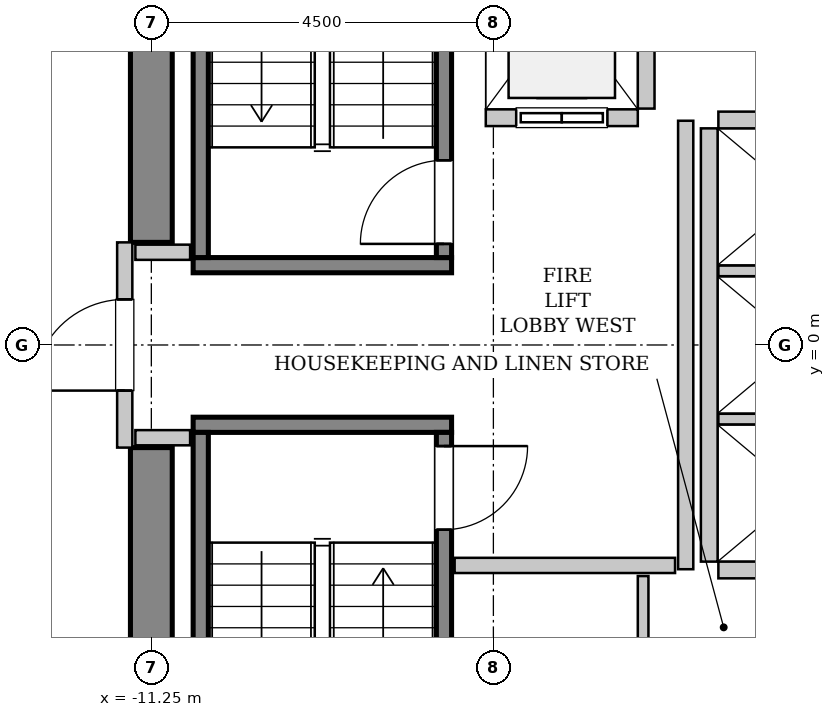
"""IFC4 building model, lengths in metres.
Left out: names, types, materials, properties, quantities, classifications, styles, units other than length and angle.
Written with IfcOpenShell. Run it as: python <this file> out.ifc"""

import sys

from ifc_helpers import new_model, si_unit, direction, frame, frame_2d, origin, place, context, subcontext, project, spatial, rectangle, extrude, source, transform, mapped, element, fill, save


model = new_model("IFC4")
c1 = context("Model", 3, precision=1e-05, world=origin(), true_north=direction((0.0, 1.0)))
c2 = subcontext(c1, "Body", "Model", "MODEL_VIEW")
j1 = project(units=[si_unit("LENGTHUNIT", "METRE"), si_unit("PLANEANGLEUNIT", "RADIAN")], contexts=[c1])
p1 = place(None, origin())
s1 = spatial("IfcSite", under=j1, at=p1, CompositionType="ELEMENT")
p2 = place(p1, origin())
s2 = spatial("IfcBuilding", under=s1, at=p2, CompositionType="ELEMENT")
p3 = place(p2, frame((0.0, 0.0, 136.4)))
s3 = spatial("IfcBuildingStorey", under=s2, at=p3, CompositionType="ELEMENT", Elevation=136.4)
m1 = source(origin(), c2, "Body", "SweptSolid", [
    extrude(rectangle(XDim=7.375, YDim=0.55, at=frame_2d((3.688, 0.0))), origin(), (0.0, 0.0, 1.0), 3.8),
])
for number, where, z_axis, x_axis in (
    (1, (-11.25, -8.725, 0.0), (0.0, 0.0, 1.0), (0.0, 1.0, 0.0)),
    (2, (-11.25, 1.35, 0.0), (0.0, 0.0, 1.0), (0.0, 1.0, 0.0)),
):
    element("IfcWall", number, at=place(p3, frame(where, z_axis=z_axis, x_axis=x_axis)), inside=s3, PredefinedType="SHEAR", context=c2, shape_type="MappedRepresentation", body=[
        mapped(m1, transform((0.0, 0.0, 0.0), x_axis=(1.0, 0.0, 0.0), y_axis=(0.0, 1.0, 0.0), z_axis=(0.0, 0.0, 1.0), scale=1.0)),
    ])
m2 = source(origin(), c2, "Body", "SweptSolid", [
    extrude(rectangle(XDim=3.4, YDim=0.2, at=frame_2d((1.7, 0.0))), origin(), (0.0, 0.0, 1.0), 3.8),
])
p4 = place(p3, frame((-7.3, 1.05, 0.0), z_axis=(0.0, 0.0, 1.0), x_axis=(-1.0, 0.0, 0.0)))
e3 = element("IfcWall", 3, at=p4, inside=s3, PredefinedType="SOLIDWALL", context=c2, shape_type="MappedRepresentation", body=[
    mapped(m2, transform((0.0, 0.0, 0.0), x_axis=(1.0, 0.0, 0.0), y_axis=(0.0, 1.0, 0.0), z_axis=(0.0, 0.0, 1.0), scale=1.0)),
])
m3 = source(origin(), c2, "Body", "SweptSolid", [
    extrude(rectangle(XDim=7.1, YDim=0.2, at=frame_2d((3.55, 0.0))), origin(), (0.0, 0.0, 1.0), 3.8),
])
p5 = place(p3, frame((-7.4, 1.15, 0.0), z_axis=(0.0, 0.0, 1.0), x_axis=(0.0, 1.0, 0.0)))
e4 = element("IfcWall", 4, at=p5, inside=s3, PredefinedType="SOLIDWALL", context=c2, shape_type="MappedRepresentation", body=[
    mapped(m3, transform((0.0, 0.0, 0.0), x_axis=(1.0, 0.0, 0.0), y_axis=(0.0, 1.0, 0.0), z_axis=(0.0, 0.0, 1.0), scale=1.0)),
])
p6 = place(p5, frame((0.18, 0.0, 0.0)))
e5 = element("IfcOpeningElement", 5, at=p6, cuts=e4, PredefinedType="OPENING", context=c2, shape_type="SweptSolid", body=[
    extrude(rectangle(XDim=1.1, YDim=2.15, at=frame_2d((0.55, 1.075))), frame((0.0, 0.11, 0.0), z_axis=(0.0, -1.0, 0.0), x_axis=(1.0, 0.0, 0.0)), (0.0, 0.0, 1.0), 0.22),
])
p7 = place(p3, frame((-10.6, 1.15, 0.0), z_axis=(0.0, 0.0, 1.0), x_axis=(0.0, 1.0, 0.0)))
e6 = element("IfcWall", 6, at=p7, inside=s3, PredefinedType="SOLIDWALL", context=c2, shape_type="MappedRepresentation", body=[
    mapped(m3, transform((0.0, 0.0, 0.0), x_axis=(1.0, 0.0, 0.0), y_axis=(0.0, 1.0, 0.0), z_axis=(0.0, 0.0, 1.0), scale=1.0)),
])
p8 = place(p3, frame((-10.7, -1.05, 0.0), z_axis=(0.0, 0.0, 1.0), x_axis=(1.0, 0.0, 0.0)))
e7 = element("IfcWall", 7, at=p8, inside=s3, PredefinedType="SOLIDWALL", context=c2, shape_type="MappedRepresentation", body=[
    mapped(m2, transform((0.0, 0.0, 0.0), x_axis=(1.0, 0.0, 0.0), y_axis=(0.0, 1.0, 0.0), z_axis=(0.0, 0.0, 1.0), scale=1.0)),
])
p9 = place(p3, frame((-10.6, -1.15, 0.0), z_axis=(0.0, 0.0, 1.0), x_axis=(0.0, -1.0, 0.0)))
e8 = element("IfcWall", 8, at=p9, inside=s3, PredefinedType="SOLIDWALL", context=c2, shape_type="MappedRepresentation", body=[
    mapped(m3, transform((0.0, 0.0, 0.0), x_axis=(1.0, 0.0, 0.0), y_axis=(0.0, 1.0, 0.0), z_axis=(0.0, 0.0, 1.0), scale=1.0)),
])
p10 = place(p3, frame((-7.4, -1.15, 0.0), z_axis=(0.0, 0.0, 1.0), x_axis=(0.0, -1.0, 0.0)))
e9 = element("IfcWall", 9, at=p10, inside=s3, PredefinedType="SOLIDWALL", context=c2, shape_type="MappedRepresentation", body=[
    mapped(m3, transform((0.0, 0.0, 0.0), x_axis=(1.0, 0.0, 0.0), y_axis=(0.0, 1.0, 0.0), z_axis=(0.0, 0.0, 1.0), scale=1.0)),
])
p11 = place(p10, frame((0.18, 0.0, 0.0)))
e10 = element("IfcOpeningElement", 10, at=p11, cuts=e9, PredefinedType="OPENING", context=c2, shape_type="SweptSolid", body=[
    extrude(rectangle(XDim=1.1, YDim=2.15, at=frame_2d((0.55, 1.075))), frame((0.0, 0.11, 0.0), z_axis=(0.0, -1.0, 0.0), x_axis=(1.0, 0.0, 0.0)), (0.0, 0.0, 1.0), 0.22),
])
m4 = source(origin(), c2, "Body", "SweptSolid", [
    extrude(rectangle(XDim=2.0, YDim=0.22, at=frame_2d((1.0, 0.0))), origin(), (0.0, 0.0, 1.0), 3.535),
])
p12 = place(p3, frame((-6.85, 2.99, 0.0), z_axis=(0.0, 0.0, 1.0), x_axis=(1.0, 0.0, 0.0)))
e11 = element("IfcWall", 11, at=p12, inside=s3, PredefinedType="SOLIDWALL", context=c2, shape_type="MappedRepresentation", body=[
    mapped(m4, transform((0.0, 0.0, 0.0), x_axis=(1.0, 0.0, 0.0), y_axis=(0.0, 1.0, 0.0), z_axis=(0.0, 0.0, 1.0), scale=1.0)),
])
p13 = place(p12, frame((0.4, 0.0, 0.0)))
e12 = element("IfcOpeningElement", 12, at=p13, cuts=e11, PredefinedType="OPENING", context=c2, shape_type="SweptSolid", body=[
    extrude(rectangle(XDim=1.2, YDim=2.2, at=frame_2d((0.6, 1.1))), frame((0.0, 0.12, 0.0), z_axis=(0.0, -1.0, 0.0), x_axis=(1.0, 0.0, 0.0)), (0.0, 0.0, 1.0), 0.24),
])
m5 = source(origin(), c2, "Body", "SweptSolid", [
    extrude(rectangle(XDim=2.68, YDim=0.22, at=frame_2d((1.34, 0.0))), origin(), (0.0, 0.0, 1.0), 3.535),
])
p14 = place(p3, frame((-4.74, 3.11, 0.0), z_axis=(0.0, 0.0, 1.0), x_axis=(0.0, 1.0, 0.0)))
e13 = element("IfcWall", 13, at=p14, inside=s3, PredefinedType="SOLIDWALL", context=c2, shape_type="MappedRepresentation", body=[
    mapped(m5, transform((0.0, 0.0, 0.0), x_axis=(1.0, 0.0, 0.0), y_axis=(0.0, 1.0, 0.0), z_axis=(0.0, 0.0, 1.0), scale=1.0)),
])
m6 = source(origin(), c2, "Body", "SweptSolid", [
    extrude(rectangle(XDim=5.7, YDim=0.22, at=frame_2d((2.85, 0.0))), origin(), (0.0, 0.0, 1.0), 3.535),
])
p15 = place(p3, frame((-3.91, 2.85, 0.0), z_axis=(0.0, 0.0, 1.0), x_axis=(0.0, -1.0, 0.0)))
e14 = element("IfcWall", 14, at=p15, inside=s3, PredefinedType="SOLIDWALL", context=c2, shape_type="MappedRepresentation", body=[
    mapped(m6, transform((0.0, 0.0, 0.0), x_axis=(1.0, 0.0, 0.0), y_axis=(0.0, 1.0, 0.0), z_axis=(0.0, 0.0, 1.0), scale=1.0)),
])
m7 = source(origin(), c2, "Body", "SweptSolid", [
    extrude(rectangle(XDim=2.13, YDim=0.22, at=frame_2d((1.065, 0.0))), origin(), (0.0, 0.0, 1.0), 3.535),
])
p16 = place(p3, frame((-3.79, -2.96, 0.0), z_axis=(0.0, 0.0, 1.0), x_axis=(1.0, 0.0, 0.0)))
e15 = element("IfcWall", 15, at=p16, inside=s3, PredefinedType="SOLIDWALL", context=c2, shape_type="MappedRepresentation", body=[
    mapped(m7, transform((0.0, 0.0, 0.0), x_axis=(1.0, 0.0, 0.0), y_axis=(0.0, 1.0, 0.0), z_axis=(0.0, 0.0, 1.0), scale=1.0)),
])
m8 = source(origin(), c2, "Body", "SweptSolid", [
    extrude(rectangle(XDim=2.13, YDim=0.14, at=frame_2d((1.065, 0.0))), origin(), (0.0, 0.0, 1.0), 3.535),
])
for number, where, z_axis, x_axis in (
    (16, (-3.79, -0.975, 0.0), (0.0, 0.0, 1.0), (1.0, 0.0, 0.0)),
    (17, (-3.79, 0.975, 0.0), (0.0, 0.0, 1.0), (1.0, 0.0, 0.0)),
):
    element("IfcWall", number, at=place(p3, frame(where, z_axis=z_axis, x_axis=x_axis)), inside=s3, PredefinedType="PARTITIONING", context=c2, shape_type="MappedRepresentation", body=[
        mapped(m8, transform((0.0, 0.0, 0.0), x_axis=(1.0, 0.0, 0.0), y_axis=(0.0, 1.0, 0.0), z_axis=(0.0, 0.0, 1.0), scale=1.0)),
    ])
p17 = place(p3, frame((-1.66, 2.96, 0.0), z_axis=(0.0, 0.0, 1.0), x_axis=(-1.0, 0.0, 0.0)))
e18 = element("IfcWall", 18, at=p17, inside=s3, PredefinedType="SOLIDWALL", context=c2, shape_type="MappedRepresentation", body=[
    mapped(m7, transform((0.0, 0.0, 0.0), x_axis=(1.0, 0.0, 0.0), y_axis=(0.0, 1.0, 0.0), z_axis=(0.0, 0.0, 1.0), scale=1.0)),
])
m9 = source(origin(), c2, "Body", "SweptSolid", [
    extrude(rectangle(XDim=2.7, YDim=0.2, at=frame_2d((1.35, 0.0))), origin(), (0.0, 0.0, 1.0), 2.425),
])
p18 = place(p3, frame((-11.6, -1.35, 0.0), z_axis=(0.0, 0.0, 1.0), x_axis=(0.0, 1.0, 0.0)))
e19 = element("IfcWall", 19, at=p18, inside=s3, PredefinedType="PARTITIONING", context=c2, shape_type="MappedRepresentation", body=[
    mapped(m9, transform((0.0, 0.0, 0.0), x_axis=(1.0, 0.0, 0.0), y_axis=(0.0, 1.0, 0.0), z_axis=(0.0, 0.0, 1.0), scale=1.0)),
])
p19 = place(p18, frame((0.75, 0.0, 0.0)))
e20 = element("IfcOpeningElement", 20, at=p19, cuts=e19, PredefinedType="OPENING", context=c2, shape_type="SweptSolid", body=[
    extrude(rectangle(XDim=1.2, YDim=2.15, at=frame_2d((0.6, 1.075))), frame((0.0, 0.11, 0.0), z_axis=(0.0, -1.0, 0.0), x_axis=(1.0, 0.0, 0.0)), (0.0, 0.0, 1.0), 0.22),
])
m10 = source(origin(), c2, "Body", "SweptSolid", [
    extrude(rectangle(XDim=5.9, YDim=0.2, at=frame_2d((2.95, 0.0))), origin(), (0.0, 0.0, 1.0), 3.535),
])
p20 = place(p3, frame((-4.22, -2.95, 0.0), z_axis=(0.0, 0.0, 1.0), x_axis=(0.0, 1.0, 0.0)))
e21 = element("IfcWall", 21, at=p20, inside=s3, PredefinedType="PARTITIONING", context=c2, shape_type="MappedRepresentation", body=[
    mapped(m10, transform((0.0, 0.0, 0.0), x_axis=(1.0, 0.0, 0.0), y_axis=(0.0, 1.0, 0.0), z_axis=(0.0, 0.0, 1.0), scale=1.0)),
])
m11 = source(origin(), c2, "Body", "SweptSolid", [
    extrude(rectangle(XDim=2.9, YDim=0.2, at=frame_2d((1.45, 0.0))), origin(), (0.0, 0.0, 1.0), 3.535),
])
p21 = place(p3, frame((-7.26, -2.9, 0.0), z_axis=(0.0, 0.0, 1.0), x_axis=(1.0, 0.0, 0.0)))
e22 = element("IfcWall", 22, at=p21, inside=s3, PredefinedType="PARTITIONING", context=c2, shape_type="MappedRepresentation", body=[
    mapped(m11, transform((0.0, 0.0, 0.0), x_axis=(1.0, 0.0, 0.0), y_axis=(0.0, 1.0, 0.0), z_axis=(0.0, 0.0, 1.0), scale=1.0)),
])
m12 = source(origin(), c2, "Body", "SweptSolid", [
    extrude(rectangle(XDim=0.72, YDim=0.2, at=frame_2d((0.36, 0.0))), origin(), (0.0, 0.0, 1.0), 3.535),
])
for number, where, z_axis, x_axis in (
    (23, (-11.46, 1.22, 0.0), (0.0, 0.0, 1.0), (1.0, 0.0, 0.0)),
    (24, (-11.46, -1.22, 0.0), (0.0, 0.0, 1.0), (1.0, 0.0, 0.0)),
):
    element("IfcWall", number, at=place(p3, frame(where, z_axis=z_axis, x_axis=x_axis)), inside=s3, PredefinedType="PARTITIONING", context=c2, shape_type="MappedRepresentation", body=[
        mapped(m12, transform((0.0, 0.0, 0.0), x_axis=(1.0, 0.0, 0.0), y_axis=(0.0, 1.0, 0.0), z_axis=(0.0, 0.0, 1.0), scale=1.0)),
    ])
m13 = source(origin(), c2, "Body", "SweptSolid", [
    extrude(rectangle(XDim=1.26, YDim=0.14, at=frame_2d((0.63, 0.0))), origin(), (0.0, 0.0, 1.0), 3.535),
])
p22 = place(p3, frame((-4.78, -4.3, 0.0), z_axis=(0.0, 0.0, 1.0), x_axis=(0.0, 1.0, 0.0)))
e25 = element("IfcWall", 25, at=p22, inside=s3, PredefinedType="PARTITIONING", context=c2, shape_type="MappedRepresentation", body=[
    mapped(m13, transform((0.0, 0.0, 0.0), x_axis=(1.0, 0.0, 0.0), y_axis=(0.0, 1.0, 0.0), z_axis=(0.0, 0.0, 1.0), scale=1.0)),
])
m14 = source(origin(), c2, "Body", "SweptSolid", [
    extrude(rectangle(XDim=1.1, YDim=2.15, at=frame_2d((0.55, 1.075))), frame((0.0, 0.025, 0.0), z_axis=(0.0, -1.0, 0.0), x_axis=(1.0, 0.0, 0.0)), (0.0, 0.0, 1.0), 0.05),
])
p23 = place(p6, origin())
e26 = element("IfcDoor", 26, at=p23, inside=s3, OperationType="SINGLE_SWING_LEFT", PredefinedType="DOOR", context=c2, shape_type="MappedRepresentation", body=[
    mapped(m14, transform((0.0, 0.0, 0.0), x_axis=(1.0, 0.0, 0.0), y_axis=(0.0, 1.0, 0.0), z_axis=(0.0, 0.0, 1.0), scale=1.0)),
])
fill(e5, e26)
p24 = place(p11, origin())
e27 = element("IfcDoor", 27, at=p24, inside=s3, OperationType="SINGLE_SWING_LEFT", PredefinedType="DOOR", context=c2, shape_type="MappedRepresentation", body=[
    mapped(m14, transform((0.0, 0.0, 0.0), x_axis=(1.0, 0.0, 0.0), y_axis=(0.0, 1.0, 0.0), z_axis=(0.0, 0.0, 1.0), scale=1.0)),
])
fill(e10, e27)
m15 = source(origin(), c2, "Body", "SweptSolid", [
    extrude(rectangle(XDim=1.2, YDim=2.2, at=frame_2d((0.6, 1.1))), frame((0.0, 0.025, 0.0), z_axis=(0.0, -1.0, 0.0), x_axis=(1.0, 0.0, 0.0)), (0.0, 0.0, 1.0), 0.05),
])
p25 = place(p13, origin())
e28 = element("IfcDoor", 28, at=p25, inside=s3, OperationType="SLIDING_TO_LEFT", PredefinedType="DOOR", context=c2, shape_type="MappedRepresentation", body=[
    mapped(m15, transform((0.0, 0.0, 0.0), x_axis=(1.0, 0.0, 0.0), y_axis=(0.0, 1.0, 0.0), z_axis=(0.0, 0.0, 1.0), scale=1.0)),
])
fill(e12, e28)
m16 = source(origin(), c2, "Body", "SweptSolid", [
    extrude(rectangle(XDim=1.2, YDim=2.15, at=frame_2d((0.6, 1.075))), frame((0.0, 0.025, 0.0), z_axis=(0.0, -1.0, 0.0), x_axis=(1.0, 0.0, 0.0)), (0.0, 0.0, 1.0), 0.05),
])
p26 = place(p19, origin())
e29 = element("IfcDoor", 29, at=p26, inside=s3, OperationType="SINGLE_SWING_LEFT", PredefinedType="DOOR", context=c2, shape_type="MappedRepresentation", body=[
    mapped(m16, transform((0.0, 0.0, 0.0), x_axis=(1.0, 0.0, 0.0), y_axis=(0.0, 1.0, 0.0), z_axis=(0.0, 0.0, 1.0), scale=1.0)),
])
fill(e20, e29)
save(model, sys.argv[1])
